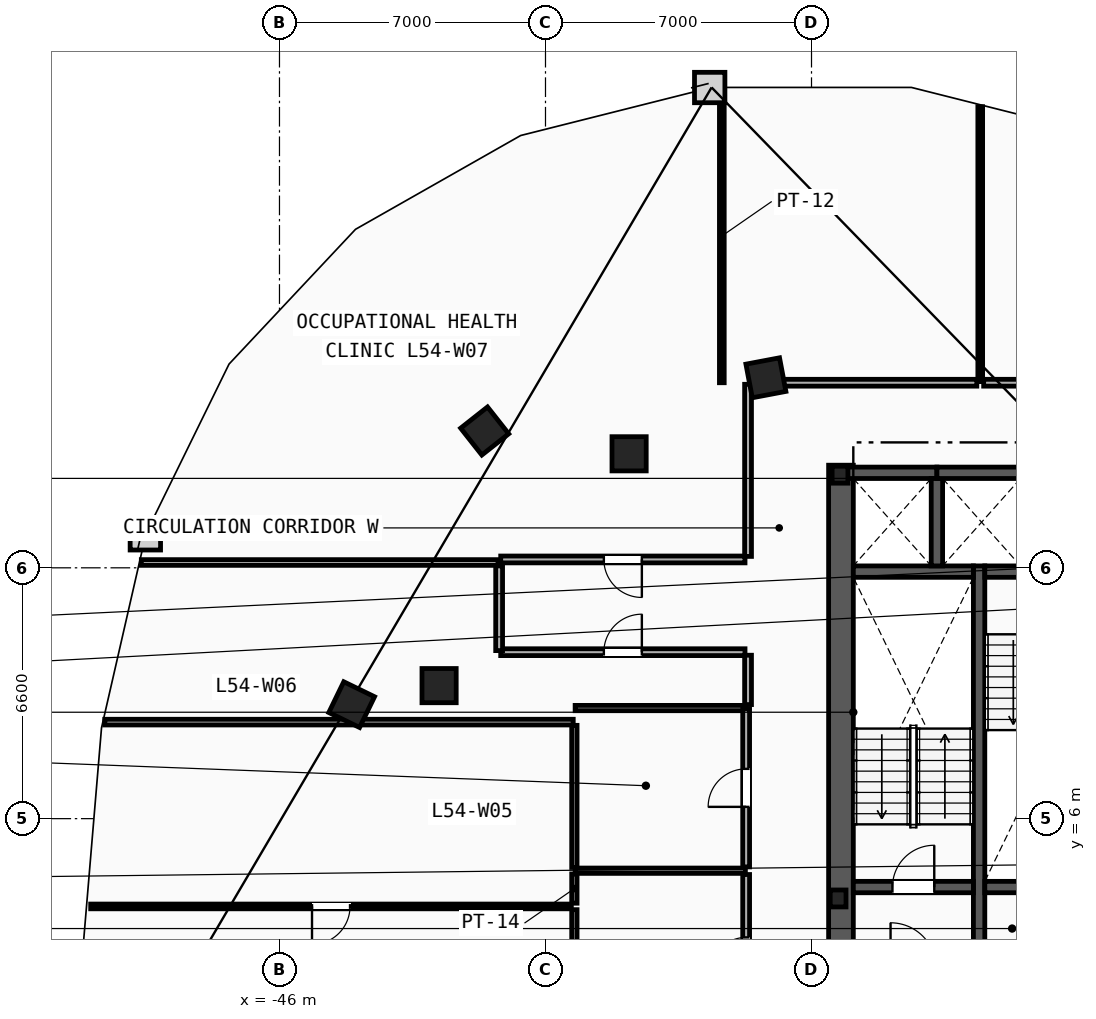
"""IFC4 building model, lengths in metres.
Left out: names, types, materials, properties, quantities, classifications, styles, units other than length and angle.
Written with IfcOpenShell. Run it as: python <this file> out.ifc"""

import sys

from ifc_helpers import new_model, si_unit, direction, frame, frame_2d, origin, origin_2d, place, context, subcontext, project, spatial, rectangle, i_section, extrude, element, fill, save


model = new_model("IFC4")
c1 = context("Model", 3, precision=1e-05, world=origin(), true_north=direction((0.0, 1.0)))
c2 = subcontext(c1, "Body", "Model", "MODEL_VIEW")
j1 = project(units=[si_unit("LENGTHUNIT", "METRE"), si_unit("PLANEANGLEUNIT", "RADIAN")], contexts=[c1])
p1 = place(None, origin())
s1 = spatial("IfcSite", under=j1, at=p1, CompositionType="ELEMENT")
p2 = place(p1, origin())
s2 = spatial("IfcBuilding", under=s1, at=p2, CompositionType="ELEMENT")
p3 = place(p2, frame((0.0, 0.0, 206.2)))
s3 = spatial("IfcBuildingStorey", under=s2, at=p3, CompositionType="ELEMENT", Elevation=206.2)
for number, where, z_axis, x_axis in (
    (1, (-31.3, 3.9, 0.0), (0.0, 0.0, 1.0), (1.0, 0.0, 0.0)),
    (2, (-31.25, 15.05, 0.0), (0.0, 0.0, 1.0), (1.0, 0.0, 0.0)),
):
    element("IfcColumn", number, at=place(p3, frame(where, z_axis=z_axis, x_axis=x_axis)), inside=s3, PredefinedType="COLUMN", context=c2, shape_type="SweptSolid", body=[
        extrude(i_section(OverallWidth=0.416, OverallDepth=0.446, WebThickness=0.039, FlangeThickness=0.063, FilletRadius=0.018, at=origin_2d()), origin(), (0.0, 0.0, 1.0), 3.6),
    ])
for number, where, z_axis, x_axis in (
    (3, (-41.8, 9.5, 0.0), (0.0, 0.0, 1.0), (1.0, 0.0, 0.0)),
    (4, (-36.8, 15.6, 0.0), (0.0, 0.0, 1.0), (1.0, 0.0, 0.0)),
    (5, (-33.2, 17.6, 0.0), (0.0, 0.0, 1.0), (-0.983, -0.186, 0.0)),
    (6, (-40.6, 16.2, 0.0), (0.0, 0.0, 1.0), (-0.785, -0.619, 0.0)),
    (7, (-44.1, 9.0, 0.0), (0.0, 0.0, 1.0), (-0.437, -0.899, 0.0)),
):
    element("IfcColumn", number, at=place(p3, frame(where, z_axis=z_axis, x_axis=x_axis)), inside=s3, PredefinedType="COLUMN", context=c2, shape_type="SweptSolid", body=[
        extrude(rectangle(XDim=0.9, YDim=0.9, at=origin_2d()), origin(), (0.0, 0.0, 1.0), 3.6),
    ])
p4 = place(p3, frame((-31.225, 1.97, 0.0), z_axis=(0.0, 0.0, 1.0), x_axis=(0.0, 1.0, 0.0)))
e8 = element("IfcWall", 8, at=p4, inside=s3, PredefinedType="SHEAR", context=c2, shape_type="SweptSolid", body=[
    extrude(rectangle(XDim=13.33, YDim=0.65, at=frame_2d((6.665, 0.0))), origin(), (0.0, 0.0, 1.0), 3.34),
])
p5 = place(p3, frame((-27.59, 1.97, 0.0), z_axis=(0.0, 0.0, 1.0), x_axis=(0.0, 1.0, 0.0)))
e9 = element("IfcWall", 9, at=p5, inside=s3, PredefinedType="SHEAR", context=c2, shape_type="SweptSolid", body=[
    extrude(rectangle(XDim=10.68, YDim=0.3, at=frame_2d((5.34, 0.0))), origin(), (0.0, 0.0, 1.0), 3.34),
])
p6 = place(p3, frame((-30.9, 4.2, 0.0), z_axis=(0.0, 0.0, 1.0), x_axis=(1.0, 0.0, 0.0)))
e10 = element("IfcWall", 10, at=p6, inside=s3, PredefinedType="SHEAR", context=c2, shape_type="SweptSolid", body=[
    extrude(rectangle(XDim=3.16, YDim=0.3, at=frame_2d((1.58, 0.0))), origin(), (0.0, 0.0, 1.0), 3.34),
])
p7 = place(p6, frame((1.03, 0.0, 0.0)))
e11 = element("IfcOpeningElement", 11, at=p7, cuts=e10, PredefinedType="OPENING", context=c2, shape_type="SweptSolid", body=[
    extrude(rectangle(XDim=1.1, YDim=2.15, at=frame_2d((0.55, 1.075))), frame((0.0, 0.16, 0.0), z_axis=(0.0, -1.0, 0.0), x_axis=(1.0, 0.0, 0.0)), (0.0, 0.0, 1.0), 0.32),
])
p8 = place(p3, frame((-30.9, 12.5, 0.0), z_axis=(0.0, 0.0, 1.0), x_axis=(1.0, 0.0, 0.0)))
e12 = element("IfcWall", 12, at=p8, inside=s3, PredefinedType="SHEAR", context=c2, shape_type="SweptSolid", body=[
    extrude(rectangle(XDim=3.16, YDim=0.3, at=frame_2d((1.58, 0.0))), origin(), (0.0, 0.0, 1.0), 3.34),
])
p9 = place(p3, frame((-27.44, 12.5, 0.0), z_axis=(0.0, 0.0, 1.0), x_axis=(1.0, 0.0, 0.0)))
e13 = element("IfcWall", 13, at=p9, inside=s3, PredefinedType="SHEAR", context=c2, shape_type="SweptSolid", body=[
    extrude(rectangle(XDim=3.16, YDim=0.3, at=frame_2d((1.58, 0.0))), origin(), (0.0, 0.0, 1.0), 3.34),
])
p10 = place(p9, frame((1.03, 0.0, 0.0)))
e14 = element("IfcOpeningElement", 14, at=p10, cuts=e13, PredefinedType="OPENING", context=c2, shape_type="SweptSolid", body=[
    extrude(rectangle(XDim=1.1, YDim=2.15, at=frame_2d((0.55, 1.075))), frame((0.0, 0.16, 0.0), z_axis=(0.0, -1.0, 0.0), x_axis=(1.0, 0.0, 0.0)), (0.0, 0.0, 1.0), 0.32),
])
p11 = place(p3, frame((-27.44, 4.2, 0.0), z_axis=(0.0, 0.0, 1.0), x_axis=(1.0, 0.0, 0.0)))
e15 = element("IfcWall", 15, at=p11, inside=s3, PredefinedType="SHEAR", context=c2, shape_type="SweptSolid", body=[
    extrude(rectangle(XDim=3.16, YDim=0.3, at=frame_2d((1.58, 0.0))), origin(), (0.0, 0.0, 1.0), 3.34),
])
p12 = place(p3, frame((-31.2, 15.1, 0.0), z_axis=(0.0, 0.0, 1.0), x_axis=(1.0, 0.0, 0.0)))
e16 = element("IfcWall", 16, at=p12, inside=s3, PredefinedType="SHEAR", context=c2, shape_type="SweptSolid", body=[
    extrude(rectangle(XDim=2.5, YDim=0.3, at=frame_2d((1.25, 0.0))), origin(), (0.0, 0.0, 1.0), 3.34),
])
p13 = place(p3, frame((-28.7, 12.65, 0.0), z_axis=(0.0, 0.0, 1.0), x_axis=(0.0, 1.0, 0.0)))
e17 = element("IfcWall", 17, at=p13, inside=s3, PredefinedType="SHEAR", context=c2, shape_type="SweptSolid", body=[
    extrude(rectangle(XDim=2.3, YDim=0.3, at=frame_2d((1.15, 0.0))), origin(), (0.0, 0.0, 1.0), 3.34),
])
p14 = place(p3, frame((-28.7, 15.1, 0.0), z_axis=(0.0, 0.0, 1.0), x_axis=(1.0, 0.0, 0.0)))
e18 = element("IfcWall", 18, at=p14, inside=s3, PredefinedType="SHEAR", context=c2, shape_type="SweptSolid", body=[
    extrude(rectangle(XDim=2.5, YDim=0.3, at=frame_2d((1.25, 0.0))), origin(), (0.0, 0.0, 1.0), 3.34),
])
p15 = place(p3, frame((-38.24, 0.27, 0.0), z_axis=(0.0, 0.0, 1.0), x_axis=(0.0, 1.0, 0.0)))
e19 = element("IfcWall", 19, at=p15, inside=s3, PredefinedType="PARTITIONING", context=c2, shape_type="SweptSolid", body=[
    extrude(rectangle(XDim=3.335, YDim=0.14, at=frame_2d((1.667, 0.0))), origin(), (0.0, 0.0, 1.0), 3.34),
])
p16 = place(p3, frame((-38.24, 3.775, 0.0), z_axis=(0.0, 0.0, 1.0), x_axis=(0.0, 1.0, 0.0)))
e20 = element("IfcWall", 20, at=p16, inside=s3, PredefinedType="PARTITIONING", context=c2, shape_type="SweptSolid", body=[
    extrude(rectangle(XDim=0.77, YDim=0.14, at=frame_2d((0.385, 0.0))), origin(), (0.0, 0.0, 1.0), 3.34),
])
p17 = place(p3, frame((-38.24, 4.715, 0.0), z_axis=(0.0, 0.0, 1.0), x_axis=(0.0, 1.0, 0.0)))
e21 = element("IfcWall", 21, at=p17, inside=s3, PredefinedType="PARTITIONING", context=c2, shape_type="SweptSolid", body=[
    extrude(rectangle(XDim=3.74, YDim=0.14, at=frame_2d((1.87, 0.0))), origin(), (0.0, 0.0, 1.0), 3.34),
])
for number, where, z_axis, x_axis in (
    (22, (-38.22, 4.63, 0.0), (0.0, 0.0, 1.0), (1.0, 0.0, 0.0)),
    (23, (-38.22, 8.91, 0.0), (0.0, 0.0, 1.0), (1.0, 0.0, 0.0)),
):
    element("IfcWall", number, at=place(p3, frame(where, z_axis=z_axis, x_axis=x_axis)), inside=s3, PredefinedType="PARTITIONING", context=c2, shape_type="SweptSolid", body=[
        extrude(rectangle(XDim=4.48, YDim=0.14, at=frame_2d((2.24, 0.0))), origin(), (0.0, 0.0, 1.0), 3.34),
    ])
p18 = place(p3, frame((-33.72, 0.27, 0.0), z_axis=(0.0, 0.0, 1.0), x_axis=(0.0, 1.0, 0.0)))
e24 = element("IfcWall", 24, at=p18, inside=s3, PredefinedType="PARTITIONING", context=c2, shape_type="SweptSolid", body=[
    extrude(rectangle(XDim=4.26, YDim=0.18, at=frame_2d((2.13, 0.0))), origin(), (0.0, 0.0, 1.0), 3.34),
])
p19 = place(p18, frame((1.655, 0.0, 0.0)))
e25 = element("IfcOpeningElement", 25, at=p19, cuts=e24, PredefinedType="OPENING", context=c2, shape_type="SweptSolid", body=[
    extrude(rectangle(XDim=0.95, YDim=2.1, at=frame_2d((0.475, 1.05))), frame((0.0, 0.1, 0.0), z_axis=(0.0, -1.0, 0.0), x_axis=(1.0, 0.0, 0.0)), (0.0, 0.0, 1.0), 0.2),
])
p20 = place(p3, frame((-33.72, 4.73, 0.0), z_axis=(0.0, 0.0, 1.0), x_axis=(0.0, 1.0, 0.0)))
e26 = element("IfcWall", 26, at=p20, inside=s3, PredefinedType="PARTITIONING", context=c2, shape_type="SweptSolid", body=[
    extrude(rectangle(XDim=4.16, YDim=0.18, at=frame_2d((2.08, 0.0))), origin(), (0.0, 0.0, 1.0), 3.34),
])
p21 = place(p20, frame((1.58, 0.0, 0.0)))
e27 = element("IfcOpeningElement", 27, at=p21, cuts=e26, PredefinedType="OPENING", context=c2, shape_type="SweptSolid", body=[
    extrude(rectangle(XDim=1.0, YDim=2.15, at=frame_2d((0.5, 1.075))), frame((0.0, 0.1, 0.0), z_axis=(0.0, -1.0, 0.0), x_axis=(1.0, 0.0, 0.0)), (0.0, 0.0, 1.0), 0.2),
])
p22 = place(p3, frame((-50.598, 8.54, 0.0), z_axis=(0.0, 0.0, 1.0), x_axis=(1.0, 0.0, 0.0)))
e28 = element("IfcWall", 28, at=p22, inside=s3, PredefinedType="PARTITIONING", context=c2, shape_type="SweptSolid", body=[
    extrude(rectangle(XDim=12.328, YDim=0.15, at=frame_2d((6.164, 0.0))), origin(), (0.0, 0.0, 1.0), 3.34),
])
p23 = place(p3, frame((-49.635, 12.74, 0.0), z_axis=(0.0, 0.0, 1.0), x_axis=(1.0, 0.0, 0.0)))
e29 = element("IfcWall", 29, at=p23, inside=s3, PredefinedType="PARTITIONING", context=c2, shape_type="SweptSolid", body=[
    extrude(rectangle(XDim=9.385, YDim=0.15, at=frame_2d((4.693, 0.0))), origin(), (0.0, 0.0, 1.0), 3.34),
])
p24 = place(p3, frame((-34.36, 17.47, 0.0), z_axis=(0.0, 0.0, 1.0), x_axis=(0.0, 1.0, 0.0)))
e30 = element("IfcWall", 30, at=p24, inside=s3, PredefinedType="PARTITIONING", context=c2, shape_type="SweptSolid", body=[
    extrude(rectangle(XDim=7.72, YDim=0.125, at=frame_2d((3.86, 0.0))), origin(), (0.0, 0.0, 1.0), 3.34),
])
p25 = place(p3, frame((-27.56, 17.5, 0.0), z_axis=(0.0, 0.0, 1.0), x_axis=(0.0, 1.0, 0.0)))
e31 = element("IfcWall", 31, at=p25, inside=s3, PredefinedType="PARTITIONING", context=c2, shape_type="SweptSolid", body=[
    extrude(rectangle(XDim=7.233, YDim=0.125, at=frame_2d((3.617, 0.0))), origin(), (0.0, 0.0, 1.0), 3.34),
])
p26 = place(p3, frame((-16.822, 17.47, 0.0), z_axis=(0.0, 0.0, 1.0), x_axis=(-1.0, 0.0, 0.0)))
e32 = element("IfcWall", 32, at=p26, inside=s3, PredefinedType="PARTITIONING", context=c2, shape_type="SweptSolid", body=[
    extrude(rectangle(XDim=10.648, YDim=0.18, at=frame_2d((5.324, 0.0))), origin(), (0.0, 0.0, 1.0), 3.34),
])
p27 = place(p26, frame((4.824, 0.0, 0.0)))
e33 = element("IfcOpeningElement", 33, at=p27, cuts=e32, PredefinedType="OPENING", context=c2, shape_type="SweptSolid", body=[
    extrude(rectangle(XDim=1.0, YDim=2.15, at=frame_2d((0.5, 1.075))), frame((0.0, 0.1, 0.0), z_axis=(0.0, -1.0, 0.0), x_axis=(1.0, 0.0, 0.0)), (0.0, 0.0, 1.0), 0.2),
])
p28 = place(p3, frame((-40.178, 10.38, 0.0), z_axis=(0.0, 0.0, 1.0), x_axis=(1.0, 0.0, 0.0)))
e34 = element("IfcWall", 34, at=p28, inside=s3, PredefinedType="PARTITIONING", context=c2, shape_type="SweptSolid", body=[
    extrude(rectangle(XDim=6.428, YDim=0.18, at=frame_2d((3.214, 0.0))), origin(), (0.0, 0.0, 1.0), 3.34),
])
p29 = place(p28, frame((2.714, 0.0, 0.0)))
e35 = element("IfcOpeningElement", 35, at=p29, cuts=e34, PredefinedType="OPENING", context=c2, shape_type="SweptSolid", body=[
    extrude(rectangle(XDim=1.0, YDim=2.15, at=frame_2d((0.5, 1.075))), frame((0.0, 0.1, 0.0), z_axis=(0.0, -1.0, 0.0), x_axis=(1.0, 0.0, 0.0)), (0.0, 0.0, 1.0), 0.2),
])
p30 = place(p3, frame((-40.22, 12.65, 0.0), z_axis=(0.0, 0.0, 1.0), x_axis=(0.0, -1.0, 0.0)))
e36 = element("IfcWall", 36, at=p30, inside=s3, PredefinedType="PARTITIONING", context=c2, shape_type="SweptSolid", body=[
    extrude(rectangle(XDim=2.229, YDim=0.18, at=frame_2d((1.114, 0.0))), origin(), (0.0, 0.0, 1.0), 3.34),
])
p31 = place(p3, frame((-33.67, 10.3, 0.0), z_axis=(0.0, 0.0, 1.0), x_axis=(0.0, -1.0, 0.0)))
e37 = element("IfcWall", 37, at=p31, inside=s3, PredefinedType="PARTITIONING", context=c2, shape_type="SweptSolid", body=[
    extrude(rectangle(XDim=1.299, YDim=0.18, at=frame_2d((0.649, 0.0))), origin(), (0.0, 0.0, 1.0), 3.34),
])
p32 = place(p3, frame((-33.75, 12.82, 0.0), z_axis=(0.0, 0.0, 1.0), x_axis=(-1.0, 0.0, 0.0)))
e38 = element("IfcWall", 38, at=p32, inside=s3, PredefinedType="PARTITIONING", context=c2, shape_type="SweptSolid", body=[
    extrude(rectangle(XDim=6.428, YDim=0.18, at=frame_2d((3.214, 0.0))), origin(), (0.0, 0.0, 1.0), 3.34),
])
p33 = place(p32, frame((2.714, 0.0, 0.0)))
e39 = element("IfcOpeningElement", 39, at=p33, cuts=e38, PredefinedType="OPENING", context=c2, shape_type="SweptSolid", body=[
    extrude(rectangle(XDim=1.0, YDim=2.15, at=frame_2d((0.5, 1.075))), frame((0.0, 0.1, 0.0), z_axis=(0.0, -1.0, 0.0), x_axis=(1.0, 0.0, 0.0)), (0.0, 0.0, 1.0), 0.2),
])
p34 = place(p3, frame((-27.65, 17.47, 0.0), z_axis=(0.0, 0.0, 1.0), x_axis=(-1.0, 0.0, 0.0)))
e40 = element("IfcWall", 40, at=p34, inside=s3, PredefinedType="PARTITIONING", context=c2, shape_type="SweptSolid", body=[
    extrude(rectangle(XDim=5.979, YDim=0.18, at=frame_2d((2.989, 0.0))), origin(), (0.0, 0.0, 1.0), 3.34),
])
p35 = place(p3, frame((-33.67, 17.428, 0.0), z_axis=(0.0, 0.0, 1.0), x_axis=(0.0, -1.0, 0.0)))
e41 = element("IfcWall", 41, at=p35, inside=s3, PredefinedType="PARTITIONING", context=c2, shape_type="SweptSolid", body=[
    extrude(rectangle(XDim=4.529, YDim=0.18, at=frame_2d((2.264, 0.0))), origin(), (0.0, 0.0, 1.0), 3.34),
])
p36 = place(p3, frame((-38.32, 3.69, 0.0), z_axis=(0.0, 0.0, 1.0), x_axis=(-1.0, 0.0, 0.0)))
e42 = element("IfcWall", 42, at=p36, inside=s3, PredefinedType="PARTITIONING", context=c2, shape_type="SweptSolid", body=[
    extrude(rectangle(XDim=12.647, YDim=0.125, at=frame_2d((6.324, 0.0))), origin(), (0.0, 0.0, 1.0), 3.34),
])
p37 = place(p36, frame((5.824, 0.0, 0.0)))
e43 = element("IfcOpeningElement", 43, at=p37, cuts=e42, PredefinedType="OPENING", context=c2, shape_type="SweptSolid", body=[
    extrude(rectangle(XDim=1.0, YDim=2.15, at=frame_2d((0.5, 1.075))), frame((0.0, 0.073, 0.0), z_axis=(0.0, -1.0, 0.0), x_axis=(1.0, 0.0, 0.0)), (0.0, 0.0, 1.0), 0.145),
])
p38 = place(p7, origin())
e44 = element("IfcDoor", 44, at=p38, inside=s3, OperationType="SINGLE_SWING_RIGHT", PredefinedType="DOOR", context=c2, shape_type="SweptSolid", body=[
    extrude(rectangle(XDim=1.1, YDim=2.15, at=frame_2d((0.55, 1.075))), frame((0.0, 0.025, 0.0), z_axis=(0.0, -1.0, 0.0), x_axis=(1.0, 0.0, 0.0)), (0.0, 0.0, 1.0), 0.05),
])
fill(e11, e44)
p39 = place(p37, origin())
e45 = element("IfcDoor", 45, at=p39, inside=s3, OperationType="SINGLE_SWING_RIGHT", PredefinedType="DOOR", context=c2, shape_type="SweptSolid", body=[
    extrude(rectangle(XDim=1.0, YDim=2.15, at=frame_2d((0.5, 1.075))), frame((0.0, 0.025, 0.0), z_axis=(0.0, -1.0, 0.0), x_axis=(1.0, 0.0, 0.0)), (0.0, 0.0, 1.0), 0.05),
])
fill(e43, e45)
p40 = place(p29, origin())
e46 = element("IfcDoor", 46, at=p40, inside=s3, OperationType="SINGLE_SWING_RIGHT", PredefinedType="DOOR", context=c2, shape_type="SweptSolid", body=[
    extrude(rectangle(XDim=1.0, YDim=2.15, at=frame_2d((0.5, 1.075))), frame((0.0, 0.025, 0.0), z_axis=(0.0, -1.0, 0.0), x_axis=(1.0, 0.0, 0.0)), (0.0, 0.0, 1.0), 0.05),
])
fill(e35, e46)
p41 = place(p33, origin())
e47 = element("IfcDoor", 47, at=p41, inside=s3, OperationType="SINGLE_SWING_LEFT", PredefinedType="DOOR", context=c2, shape_type="SweptSolid", body=[
    extrude(rectangle(XDim=1.0, YDim=2.15, at=frame_2d((0.5, 1.075))), frame((0.0, 0.025, 0.0), z_axis=(0.0, -1.0, 0.0), x_axis=(1.0, 0.0, 0.0)), (0.0, 0.0, 1.0), 0.05),
])
fill(e39, e47)
p42 = place(p19, origin())
e48 = element("IfcDoor", 48, at=p42, inside=s3, OperationType="SINGLE_SWING_LEFT", PredefinedType="DOOR", context=c2, shape_type="SweptSolid", body=[
    extrude(rectangle(XDim=0.95, YDim=2.1, at=frame_2d((0.475, 1.05))), frame((0.0, 0.025, 0.0), z_axis=(0.0, -1.0, 0.0), x_axis=(1.0, 0.0, 0.0)), (0.0, 0.0, 1.0), 0.05),
])
fill(e25, e48)
p43 = place(p21, origin())
e49 = element("IfcDoor", 49, at=p43, inside=s3, OperationType="SINGLE_SWING_LEFT", PredefinedType="DOOR", context=c2, shape_type="SweptSolid", body=[
    extrude(rectangle(XDim=1.0, YDim=2.15, at=frame_2d((0.5, 1.075))), frame((0.0, 0.025, 0.0), z_axis=(0.0, -1.0, 0.0), x_axis=(1.0, 0.0, 0.0)), (0.0, 0.0, 1.0), 0.05),
])
fill(e27, e49)
save(model, sys.argv[1])
